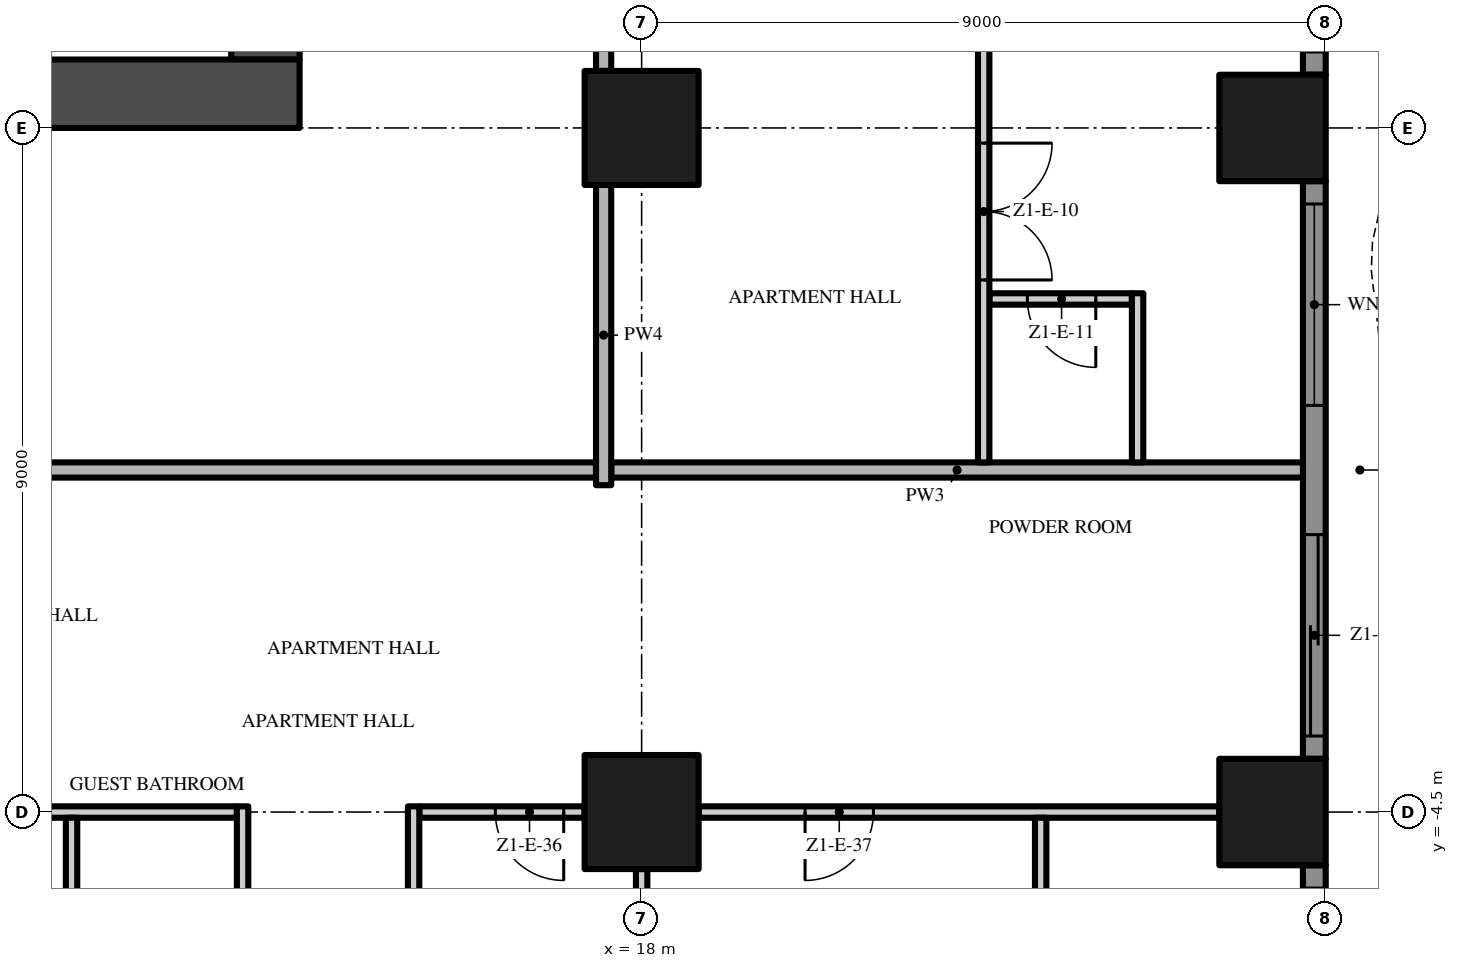
"""IFC4 building model, lengths in metres.
Left out: names, types, materials, properties, quantities, classifications, styles, units other than length and angle.
Written with IfcOpenShell. Run it as: python <this file> out.ifc"""

import sys

from ifc_helpers import new_model, si_unit, direction, frame, frame_2d, origin, origin_2d, place, context, subcontext, project, spatial, polyline, rectangle, outline, extrude, element, fill, save


model = new_model("IFC4")
c1 = context("Model", 3, precision=1e-05, world=origin(), true_north=direction((0.0, 1.0)))
c2 = subcontext(c1, "Body", "Model", "MODEL_VIEW")
j1 = project(units=[si_unit("LENGTHUNIT", "METRE"), si_unit("PLANEANGLEUNIT", "RADIAN")], contexts=[c1])
p1 = place(None, origin())
s1 = spatial("IfcSite", under=j1, at=p1, CompositionType="ELEMENT")
p2 = place(p1, origin())
s2 = spatial("IfcBuilding", under=s1, at=p2, CompositionType="ELEMENT")
p3 = place(p2, frame((0.0, 0.0, 56.8)))
s3 = spatial("IfcBuildingStorey", under=s2, at=p3, CompositionType="ELEMENT", Elevation=56.8)
p4 = place(p3, frame((-13.5, 4.95, -0.3), z_axis=(0.0, 0.0, 1.0), x_axis=(1.0, 0.0, 0.0)))
e1 = element("IfcWall", 1, at=p4, inside=s3, PredefinedType="SHEAR", context=c2, shape_type="SweptSolid", body=[
    extrude(rectangle(XDim=27.0, YDim=0.9, at=frame_2d((13.5, 0.0))), origin(), (0.0, 0.0, 1.0), 3.8),
])
p5 = place(p4, frame((12.0, 0.0, 0.3)))
e2 = element("IfcOpeningElement", 2, at=p5, cuts=e1, PredefinedType="OPENING", context=c2, shape_type="SweptSolid", body=[
    extrude(rectangle(XDim=3.0, YDim=2.4, at=frame_2d((1.5, 1.2))), frame((0.0, 0.46, 0.0), z_axis=(0.0, -1.0, 0.0), x_axis=(1.0, 0.0, 0.0)), (0.0, 0.0, 1.0), 0.92),
])
p6 = place(p4, frame((4.9, 0.0, 0.3)))
e3 = element("IfcOpeningElement", 3, at=p6, cuts=e1, PredefinedType="OPENING", context=c2, shape_type="SweptSolid", body=[
    extrude(rectangle(XDim=1.2, YDim=2.2, at=frame_2d((0.6, 1.1))), frame((0.0, 0.46, 0.0), z_axis=(0.0, -1.0, 0.0), x_axis=(1.0, 0.0, 0.0)), (0.0, 0.0, 1.0), 0.92),
])
p7 = place(p4, frame((20.75, 0.0, 0.3)))
e4 = element("IfcOpeningElement", 4, at=p7, cuts=e1, PredefinedType="OPENING", context=c2, shape_type="SweptSolid", body=[
    extrude(rectangle(XDim=1.5, YDim=2.2, at=frame_2d((0.75, 1.1))), frame((0.0, 0.46, 0.0), z_axis=(0.0, -1.0, 0.0), x_axis=(1.0, 0.0, 0.0)), (0.0, 0.0, 1.0), 0.92),
])
p8 = place(p4, frame((17.4, 0.0, 0.3)))
e5 = element("IfcOpeningElement", 5, at=p8, cuts=e1, PredefinedType="OPENING", context=c2, shape_type="SweptSolid", body=[
    extrude(rectangle(XDim=1.2, YDim=2.2, at=frame_2d((0.6, 1.1))), frame((0.0, 0.46, 0.0), z_axis=(0.0, -1.0, 0.0), x_axis=(1.0, 0.0, 0.0)), (0.0, 0.0, 1.0), 0.92),
])
p9 = place(p3, frame((13.05, 5.4, -0.3), z_axis=(0.0, 0.0, 1.0), x_axis=(0.0, 1.0, 0.0)))
e6 = element("IfcWall", 6, at=p9, inside=s3, PredefinedType="SHEAR", context=c2, shape_type="SweptSolid", body=[
    extrude(rectangle(XDim=16.2, YDim=0.9, at=frame_2d((8.1, 0.0))), origin(), (0.0, 0.0, 1.0), 3.8),
])
p10 = place(p9, frame((6.0, 0.0, 0.3)))
e7 = element("IfcOpeningElement", 7, at=p10, cuts=e6, PredefinedType="OPENING", context=c2, shape_type="SweptSolid", body=[
    extrude(rectangle(XDim=1.2, YDim=2.2, at=frame_2d((0.6, 1.1))), frame((0.0, 0.46, 0.0), z_axis=(0.0, -1.0, 0.0), x_axis=(1.0, 0.0, 0.0)), (0.0, 0.0, 1.0), 0.92),
])
for number, where, z_axis, x_axis in (
    (8, (18.0, -4.5, 0.0), (0.0, 0.0, 1.0), (1.0, 0.0, 0.0)),
    (9, (18.0, 4.5, 0.0), (0.0, 0.0, 1.0), (1.0, 0.0, 0.0)),
):
    element("IfcColumn", number, at=place(p3, frame(where, z_axis=z_axis, x_axis=x_axis)), inside=s3, PredefinedType="COLUMN", context=c2, shape_type="SweptSolid", body=[
        extrude(rectangle(XDim=1.5, YDim=1.5, at=origin_2d()), origin(), (0.0, 0.0, 1.0), 3.5),
    ])
for number, where, z_axis, x_axis in (
    (10, (26.3, -4.5, 0.0), (0.0, 0.0, 1.0), (1.0, 0.0, 0.0)),
    (11, (26.3, 4.5, 0.0), (0.0, 0.0, 1.0), (1.0, 0.0, 0.0)),
):
    element("IfcColumn", number, at=place(p3, frame(where, z_axis=z_axis, x_axis=x_axis)), inside=s3, PredefinedType="COLUMN", context=c2, shape_type="SweptSolid", body=[
        extrude(rectangle(XDim=1.4, YDim=1.4, at=origin_2d()), origin(), (0.0, 0.0, 1.0), 3.5),
    ])
p11 = place(p3, frame((26.85, -5.2, 0.0), z_axis=(0.0, 0.0, 1.0), x_axis=(0.0, -1.0, 0.0)))
e12 = element("IfcWall", 12, at=p11, inside=s3, PredefinedType="SOLIDWALL", context=c2, shape_type="SweptSolid", body=[
    extrude(rectangle(XDim=7.6, YDim=0.3, at=frame_2d((3.8, 0.0))), origin(), (0.0, 0.0, 1.0), 3.5),
])
p12 = place(p11, frame((4.65, 0.0, 0.45)))
e13 = element("IfcOpeningElement", 13, at=p12, cuts=e12, PredefinedType="OPENING", context=c2, shape_type="SweptSolid", body=[
    extrude(rectangle(XDim=2.65, YDim=2.65, at=frame_2d((1.325, 1.325))), frame((0.0, 0.16, 0.0), z_axis=(0.0, -1.0, 0.0), x_axis=(1.0, 0.0, 0.0)), (0.0, 0.0, 1.0), 0.32),
])
p13 = place(p11, frame((0.3, 0.0, 0.0)))
e14 = element("IfcOpeningElement", 14, at=p13, cuts=e12, PredefinedType="OPENING", context=c2, shape_type="SweptSolid", body=[
    extrude(rectangle(XDim=2.65, YDim=2.4, at=frame_2d((1.325, 1.2))), frame((0.0, 0.16, 0.0), z_axis=(0.0, -1.0, 0.0), x_axis=(1.0, 0.0, 0.0)), (0.0, 0.0, 1.0), 0.32),
])
p14 = place(p3, frame((26.85, 3.8, 0.0), z_axis=(0.0, 0.0, 1.0), x_axis=(0.0, -1.0, 0.0)))
e15 = element("IfcWall", 15, at=p14, inside=s3, PredefinedType="SOLIDWALL", context=c2, shape_type="SweptSolid", body=[
    extrude(rectangle(XDim=7.6, YDim=0.3, at=frame_2d((3.8, 0.0))), origin(), (0.0, 0.0, 1.0), 3.5),
])
p15 = place(p14, frame((4.65, 0.0, 0.0)))
e16 = element("IfcOpeningElement", 16, at=p15, cuts=e15, PredefinedType="OPENING", context=c2, shape_type="SweptSolid", body=[
    extrude(rectangle(XDim=2.65, YDim=2.4, at=frame_2d((1.325, 1.2))), frame((0.0, 0.16, 0.0), z_axis=(0.0, -1.0, 0.0), x_axis=(1.0, 0.0, 0.0)), (0.0, 0.0, 1.0), 0.32),
])
p16 = place(p14, frame((0.3, 0.0, 0.45)))
e17 = element("IfcOpeningElement", 17, at=p16, cuts=e15, PredefinedType="OPENING", context=c2, shape_type="SweptSolid", body=[
    extrude(rectangle(XDim=2.65, YDim=2.65, at=frame_2d((1.325, 1.325))), frame((0.0, 0.16, 0.0), z_axis=(0.0, -1.0, 0.0), x_axis=(1.0, 0.0, 0.0)), (0.0, 0.0, 1.0), 0.32),
])
p17 = place(p3, frame((26.85, 12.8, 0.0), z_axis=(0.0, 0.0, 1.0), x_axis=(0.0, -1.0, 0.0)))
e18 = element("IfcWall", 18, at=p17, inside=s3, PredefinedType="SOLIDWALL", context=c2, shape_type="SweptSolid", body=[
    extrude(rectangle(XDim=7.6, YDim=0.3, at=frame_2d((3.8, 0.0))), origin(), (0.0, 0.0, 1.0), 3.5),
])
p18 = place(p17, frame((4.65, 0.0, 0.45)))
e19 = element("IfcOpeningElement", 19, at=p18, cuts=e18, PredefinedType="OPENING", context=c2, shape_type="SweptSolid", body=[
    extrude(rectangle(XDim=2.65, YDim=2.65, at=frame_2d((1.325, 1.325))), frame((0.0, 0.16, 0.0), z_axis=(0.0, -1.0, 0.0), x_axis=(1.0, 0.0, 0.0)), (0.0, 0.0, 1.0), 0.32),
])
p19 = place(p17, frame((0.3, 0.0, 0.0)))
e20 = element("IfcOpeningElement", 20, at=p19, cuts=e18, PredefinedType="OPENING", context=c2, shape_type="SweptSolid", body=[
    extrude(rectangle(XDim=2.65, YDim=2.4, at=frame_2d((1.325, 1.2))), frame((0.0, 0.16, 0.0), z_axis=(0.0, -1.0, 0.0), x_axis=(1.0, 0.0, 0.0)), (0.0, 0.0, 1.0), 0.32),
])
p20 = place(p3, origin())
e21 = element("IfcWall", 21, at=p20, inside=s3, PredefinedType="USERDEFINED", context=c2, shape_type="SweptSolid", body=[
    extrude(outline(polyline([(29.649, -18.0), (28.988, -16.5), (28.255, -15.0), (27.731, -13.5), (27.6, -12.375), (27.615, -12.0), (27.951, -10.5), (28.612, -9.0), (29.345, -7.5), (29.869, -6.0), (30.0, -4.875), (29.985, -4.5), (29.649, -3.0), (28.988, -1.5), (28.255, 0.0), (27.731, 1.5), (27.6, 2.625), (27.615, 3.0), (27.951, 4.5), (28.612, 6.0), (29.345, 7.5), (29.869, 9.0), (30.0, 10.125), (29.985, 10.5), (29.649, 12.0), (28.988, 13.5), (28.255, 15.0), (27.731, 16.5), (27.6, 17.625), (27.615, 18.0), (27.365, 18.01), (27.349, 17.615), (27.486, 16.444), (28.024, 14.904), (28.761, 13.395), (29.41, 11.921), (29.736, 10.467), (29.749, 10.135), (29.624, 9.056), (29.114, 7.596), (28.385, 6.105), (27.713, 4.579), (27.366, 3.033), (27.349, 2.615), (27.486, 1.444), (28.024, -0.096), (28.761, -1.605), (29.41, -3.079), (29.736, -4.533), (29.749, -4.865), (29.624, -5.944), (29.114, -7.404), (28.385, -8.895), (27.713, -10.421), (27.366, -11.967), (27.349, -12.385), (27.486, -13.556), (28.024, -15.096), (28.761, -16.605), (29.42, -18.101), (29.649, -18.0)])), origin(), (0.0, 0.0, 1.0), 0.9),
])
p21 = place(p3, frame((9.75, -4.5, 0.0), z_axis=(0.0, 0.0, 1.0), x_axis=(1.0, 0.0, 0.0)))
e22 = element("IfcWall", 22, at=p21, inside=s3, PredefinedType="PARTITIONING", context=c2, shape_type="SweptSolid", body=[
    extrude(rectangle(XDim=2.925, YDim=0.15, at=frame_2d((1.462, 0.0))), origin(), (0.0, 0.0, 1.0), 3.5),
])
p22 = place(p3, frame((17.25, -4.5, 0.0), z_axis=(0.0, 0.0, 1.0), x_axis=(-1.0, 0.0, 0.0)))
e23 = element("IfcWall", 23, at=p22, inside=s3, PredefinedType="PARTITIONING", context=c2, shape_type="SweptSolid", body=[
    extrude(rectangle(XDim=2.175, YDim=0.15, at=frame_2d((1.087, 0.0))), origin(), (0.0, 0.0, 1.0), 3.5),
])
p23 = place(p22, frame((0.275, 0.0, 0.0)))
e24 = element("IfcOpeningElement", 24, at=p23, cuts=e23, PredefinedType="OPENING", context=c2, shape_type="SweptSolid", body=[
    extrude(rectangle(XDim=0.9, YDim=2.1, at=frame_2d((0.45, 1.05))), frame((0.0, 0.085, 0.0), z_axis=(0.0, -1.0, 0.0), x_axis=(1.0, 0.0, 0.0)), (0.0, 0.0, 1.0), 0.17),
])
p24 = place(p3, frame((25.6, -4.5, 0.0), z_axis=(0.0, 0.0, 1.0), x_axis=(-1.0, 0.0, 0.0)))
e25 = element("IfcWall", 25, at=p24, inside=s3, PredefinedType="PARTITIONING", context=c2, shape_type="SweptSolid", body=[
    extrude(rectangle(XDim=6.85, YDim=0.15, at=frame_2d((3.425, 0.0))), origin(), (0.0, 0.0, 1.0), 3.5),
])
p25 = place(p24, frame((4.55, 0.0, 0.0)))
e26 = element("IfcOpeningElement", 26, at=p25, cuts=e25, PredefinedType="OPENING", context=c2, shape_type="SweptSolid", body=[
    extrude(rectangle(XDim=0.9, YDim=2.1, at=frame_2d((0.45, 1.05))), frame((0.0, 0.085, 0.0), z_axis=(0.0, -1.0, 0.0), x_axis=(1.0, 0.0, 0.0)), (0.0, 0.0, 1.0), 0.17),
])
p26 = place(p3, frame((17.4, 0.0, 0.0), z_axis=(0.0, 0.0, 1.0), x_axis=(-1.0, 0.0, 0.0)))
e27 = element("IfcWall", 27, at=p26, inside=s3, PredefinedType="PARTITIONING", context=c2, shape_type="SweptSolid", body=[
    extrude(rectangle(XDim=17.3, YDim=0.2, at=frame_2d((8.65, 0.0))), origin(), (0.0, 0.0, 1.0), 3.5),
])
p27 = place(p26, frame((7.65, 0.0, 0.0)))
e28 = element("IfcOpeningElement", 28, at=p27, cuts=e27, PredefinedType="OPENING", context=c2, shape_type="SweptSolid", body=[
    extrude(rectangle(XDim=1.5, YDim=2.4, at=frame_2d((0.75, 1.2))), frame((0.0, 0.11, 0.0), z_axis=(0.0, -1.0, 0.0), x_axis=(1.0, 0.0, 0.0)), (0.0, 0.0, 1.0), 0.22),
])
p28 = place(p3, frame((17.6, 0.0, 0.0), z_axis=(0.0, 0.0, 1.0), x_axis=(1.0, 0.0, 0.0)))
e29 = element("IfcWall", 29, at=p28, inside=s3, PredefinedType="PARTITIONING", context=c2, shape_type="SweptSolid", body=[
    extrude(rectangle(XDim=9.1, YDim=0.2, at=frame_2d((4.55, 0.0))), origin(), (0.0, 0.0, 1.0), 3.5),
])
p29 = place(p3, frame((24.45, 2.25, 0.0), z_axis=(0.0, 0.0, 1.0), x_axis=(-1.0, 0.0, 0.0)))
e30 = element("IfcWall", 30, at=p29, inside=s3, PredefinedType="PARTITIONING", context=c2, shape_type="SweptSolid", body=[
    extrude(rectangle(XDim=1.875, YDim=0.15, at=frame_2d((0.938, 0.0))), origin(), (0.0, 0.0, 1.0), 3.5),
])
p30 = place(p29, frame((0.475, 0.0, 0.0)))
e31 = element("IfcOpeningElement", 31, at=p30, cuts=e30, PredefinedType="OPENING", context=c2, shape_type="SweptSolid", body=[
    extrude(rectangle(XDim=0.9, YDim=2.1, at=frame_2d((0.45, 1.05))), frame((0.0, 0.085, 0.0), z_axis=(0.0, -1.0, 0.0), x_axis=(1.0, 0.0, 0.0)), (0.0, 0.0, 1.0), 0.17),
])
p31 = place(p3, frame((10.5, -8.925, 0.0), z_axis=(0.0, 0.0, 1.0), x_axis=(0.0, 1.0, 0.0)))
e32 = element("IfcWall", 32, at=p31, inside=s3, PredefinedType="PARTITIONING", context=c2, shape_type="SweptSolid", body=[
    extrude(rectangle(XDim=4.35, YDim=0.15, at=frame_2d((2.175, 0.0))), origin(), (0.0, 0.0, 1.0), 3.5),
])
p32 = place(p3, frame((12.75, -8.925, 0.0), z_axis=(0.0, 0.0, 1.0), x_axis=(0.0, 1.0, 0.0)))
e33 = element("IfcWall", 33, at=p32, inside=s3, PredefinedType="PARTITIONING", context=c2, shape_type="SweptSolid", body=[
    extrude(rectangle(XDim=4.5, YDim=0.15, at=frame_2d((2.25, 0.0))), origin(), (0.0, 0.0, 1.0), 3.5),
])
p33 = place(p32, frame((1.75, 0.0, 0.0)))
e34 = element("IfcOpeningElement", 34, at=p33, cuts=e33, PredefinedType="OPENING", context=c2, shape_type="SweptSolid", body=[
    extrude(rectangle(XDim=0.9, YDim=2.1, at=frame_2d((0.45, 1.05))), frame((0.0, 0.085, 0.0), z_axis=(0.0, -1.0, 0.0), x_axis=(1.0, 0.0, 0.0)), (0.0, 0.0, 1.0), 0.17),
])
p34 = place(p3, frame((15.0, -9.075, 0.0), z_axis=(0.0, 0.0, 1.0), x_axis=(0.0, 1.0, 0.0)))
e35 = element("IfcWall", 35, at=p34, inside=s3, PredefinedType="PARTITIONING", context=c2, shape_type="SweptSolid", body=[
    extrude(rectangle(XDim=4.65, YDim=0.15, at=frame_2d((2.325, 0.0))), origin(), (0.0, 0.0, 1.0), 3.5),
])
p35 = place(p3, frame((17.5, -0.2, 0.0), z_axis=(0.0, 0.0, 1.0), x_axis=(0.0, 1.0, 0.0)))
e36 = element("IfcWall", 36, at=p35, inside=s3, PredefinedType="PARTITIONING", context=c2, shape_type="SweptSolid", body=[
    extrude(rectangle(XDim=3.95, YDim=0.2, at=frame_2d((1.975, 0.0))), origin(), (0.0, 0.0, 1.0), 3.5),
])
p36 = place(p3, frame((17.5, 12.75, 0.0), z_axis=(0.0, 0.0, 1.0), x_axis=(0.0, -1.0, 0.0)))
e37 = element("IfcWall", 37, at=p36, inside=s3, PredefinedType="PARTITIONING", context=c2, shape_type="SweptSolid", body=[
    extrude(rectangle(XDim=7.5, YDim=0.2, at=frame_2d((3.75, 0.0))), origin(), (0.0, 0.0, 1.0), 3.5),
])
p37 = place(p36, frame((5.4, 0.0, 0.0)))
e38 = element("IfcOpeningElement", 38, at=p37, cuts=e37, PredefinedType="OPENING", context=c2, shape_type="SweptSolid", body=[
    extrude(rectangle(XDim=1.2, YDim=2.4, at=frame_2d((0.6, 1.2))), frame((0.0, 0.11, 0.0), z_axis=(0.0, -1.0, 0.0), x_axis=(1.0, 0.0, 0.0)), (0.0, 0.0, 1.0), 0.22),
])
p38 = place(p3, frame((18.0, -8.925, 0.0), z_axis=(0.0, 0.0, 1.0), x_axis=(0.0, 1.0, 0.0)))
e39 = element("IfcWall", 39, at=p38, inside=s3, PredefinedType="PARTITIONING", context=c2, shape_type="SweptSolid", body=[
    extrude(rectangle(XDim=3.675, YDim=0.15, at=frame_2d((1.837, 0.0))), origin(), (0.0, 0.0, 1.0), 3.5),
])
p39 = place(p3, frame((22.5, 17.3, 0.0), z_axis=(0.0, 0.0, 1.0), x_axis=(0.0, -1.0, 0.0)))
e40 = element("IfcWall", 40, at=p39, inside=s3, PredefinedType="PARTITIONING", context=c2, shape_type="SweptSolid", body=[
    extrude(rectangle(XDim=17.2, YDim=0.15, at=frame_2d((8.6, 0.0))), origin(), (0.0, 0.0, 1.0), 3.5),
])
p40 = place(p39, frame((13.0, 0.0, 0.0)))
e41 = element("IfcOpeningElement", 41, at=p40, cuts=e40, PredefinedType="OPENING", context=c2, shape_type="SweptSolid", body=[
    extrude(rectangle(XDim=1.8, YDim=2.4, at=frame_2d((0.9, 1.2))), frame((0.0, 0.085, 0.0), z_axis=(0.0, -1.0, 0.0), x_axis=(1.0, 0.0, 0.0)), (0.0, 0.0, 1.0), 0.17),
])
p41 = place(p39, frame((5.55, 0.0, 0.0)))
e42 = element("IfcOpeningElement", 42, at=p41, cuts=e40, PredefinedType="OPENING", context=c2, shape_type="SweptSolid", body=[
    extrude(rectangle(XDim=1.0, YDim=2.4, at=frame_2d((0.5, 1.2))), frame((0.0, 0.085, 0.0), z_axis=(0.0, -1.0, 0.0), x_axis=(1.0, 0.0, 0.0)), (0.0, 0.0, 1.0), 0.17),
])
p42 = place(p39, frame((0.15, 0.0, 0.0)))
e43 = element("IfcOpeningElement", 43, at=p42, cuts=e40, PredefinedType="OPENING", context=c2, shape_type="SweptSolid", body=[
    extrude(rectangle(XDim=1.0, YDim=2.4, at=frame_2d((0.5, 1.2))), frame((0.0, 0.085, 0.0), z_axis=(0.0, -1.0, 0.0), x_axis=(1.0, 0.0, 0.0)), (0.0, 0.0, 1.0), 0.17),
])
p43 = place(p3, frame((23.25, -4.575, 0.0), z_axis=(0.0, 0.0, 1.0), x_axis=(0.0, -1.0, 0.0)))
e44 = element("IfcWall", 44, at=p43, inside=s3, PredefinedType="PARTITIONING", context=c2, shape_type="SweptSolid", body=[
    extrude(rectangle(XDim=4.35, YDim=0.15, at=frame_2d((2.175, 0.0))), origin(), (0.0, 0.0, 1.0), 3.5),
])
p44 = place(p43, frame((1.7, 0.0, 0.0)))
e45 = element("IfcOpeningElement", 45, at=p44, cuts=e44, PredefinedType="OPENING", context=c2, shape_type="SweptSolid", body=[
    extrude(rectangle(XDim=0.9, YDim=2.1, at=frame_2d((0.45, 1.05))), frame((0.0, 0.085, 0.0), z_axis=(0.0, -1.0, 0.0), x_axis=(1.0, 0.0, 0.0)), (0.0, 0.0, 1.0), 0.17),
])
p45 = place(p3, frame((24.525, 0.1, 0.0), z_axis=(0.0, 0.0, 1.0), x_axis=(0.0, 1.0, 0.0)))
e46 = element("IfcWall", 46, at=p45, inside=s3, PredefinedType="PARTITIONING", context=c2, shape_type="SweptSolid", body=[
    extrude(rectangle(XDim=2.225, YDim=0.15, at=frame_2d((1.113, 0.0))), origin(), (0.0, 0.0, 1.0), 3.5),
])
p46 = place(p15, origin())
e47 = element("IfcDoor", 47, at=p46, inside=s3, OperationType="SINGLE_SWING_LEFT", PredefinedType="DOOR", context=c2, shape_type="SweptSolid", body=[
    extrude(rectangle(XDim=2.65, YDim=2.4, at=frame_2d((1.325, 1.2))), frame((0.0, 0.025, 0.0), z_axis=(0.0, -1.0, 0.0), x_axis=(1.0, 0.0, 0.0)), (0.0, 0.0, 1.0), 0.05),
])
fill(e16, e47)
p47 = place(p16, origin())
e48 = element("IfcWindow", 48, at=p47, inside=s3, PartitioningType="SINGLE_PANEL", PredefinedType="WINDOW", context=c2, shape_type="SweptSolid", body=[
    extrude(rectangle(XDim=2.65, YDim=2.65, at=frame_2d((1.325, 1.325))), frame((0.0, 0.03, 0.0), z_axis=(0.0, -1.0, 0.0), x_axis=(1.0, 0.0, 0.0)), (0.0, 0.0, 1.0), 0.06),
])
fill(e17, e48)
p48 = place(p40, origin())
e49 = element("IfcDoor", 49, at=p48, inside=s3, OperationType="DOUBLE_DOOR_SINGLE_SWING", PredefinedType="DOOR", context=c2, shape_type="SweptSolid", body=[
    extrude(rectangle(XDim=1.8, YDim=2.4, at=frame_2d((0.9, 1.2))), frame((0.0, 0.025, 0.0), z_axis=(0.0, -1.0, 0.0), x_axis=(1.0, 0.0, 0.0)), (0.0, 0.0, 1.0), 0.05),
])
fill(e41, e49)
p49 = place(p30, origin())
e50 = element("IfcDoor", 50, at=p49, inside=s3, OperationType="SINGLE_SWING_LEFT", PredefinedType="DOOR", context=c2, shape_type="SweptSolid", body=[
    extrude(rectangle(XDim=0.9, YDim=2.1, at=frame_2d((0.45, 1.05))), frame((0.0, 0.025, 0.0), z_axis=(0.0, -1.0, 0.0), x_axis=(1.0, 0.0, 0.0)), (0.0, 0.0, 1.0), 0.05),
])
fill(e31, e50)
p50 = place(p23, origin())
e51 = element("IfcDoor", 51, at=p50, inside=s3, OperationType="SINGLE_SWING_LEFT", PredefinedType="DOOR", context=c2, shape_type="SweptSolid", body=[
    extrude(rectangle(XDim=0.9, YDim=2.1, at=frame_2d((0.45, 1.05))), frame((0.0, 0.025, 0.0), z_axis=(0.0, -1.0, 0.0), x_axis=(1.0, 0.0, 0.0)), (0.0, 0.0, 1.0), 0.05),
])
fill(e24, e51)
p51 = place(p25, origin())
e52 = element("IfcDoor", 52, at=p51, inside=s3, OperationType="SINGLE_SWING_RIGHT", PredefinedType="DOOR", context=c2, shape_type="SweptSolid", body=[
    extrude(rectangle(XDim=0.9, YDim=2.1, at=frame_2d((0.45, 1.05))), frame((0.0, 0.025, 0.0), z_axis=(0.0, -1.0, 0.0), x_axis=(1.0, 0.0, 0.0)), (0.0, 0.0, 1.0), 0.05),
])
fill(e26, e52)
save(model, sys.argv[1])
